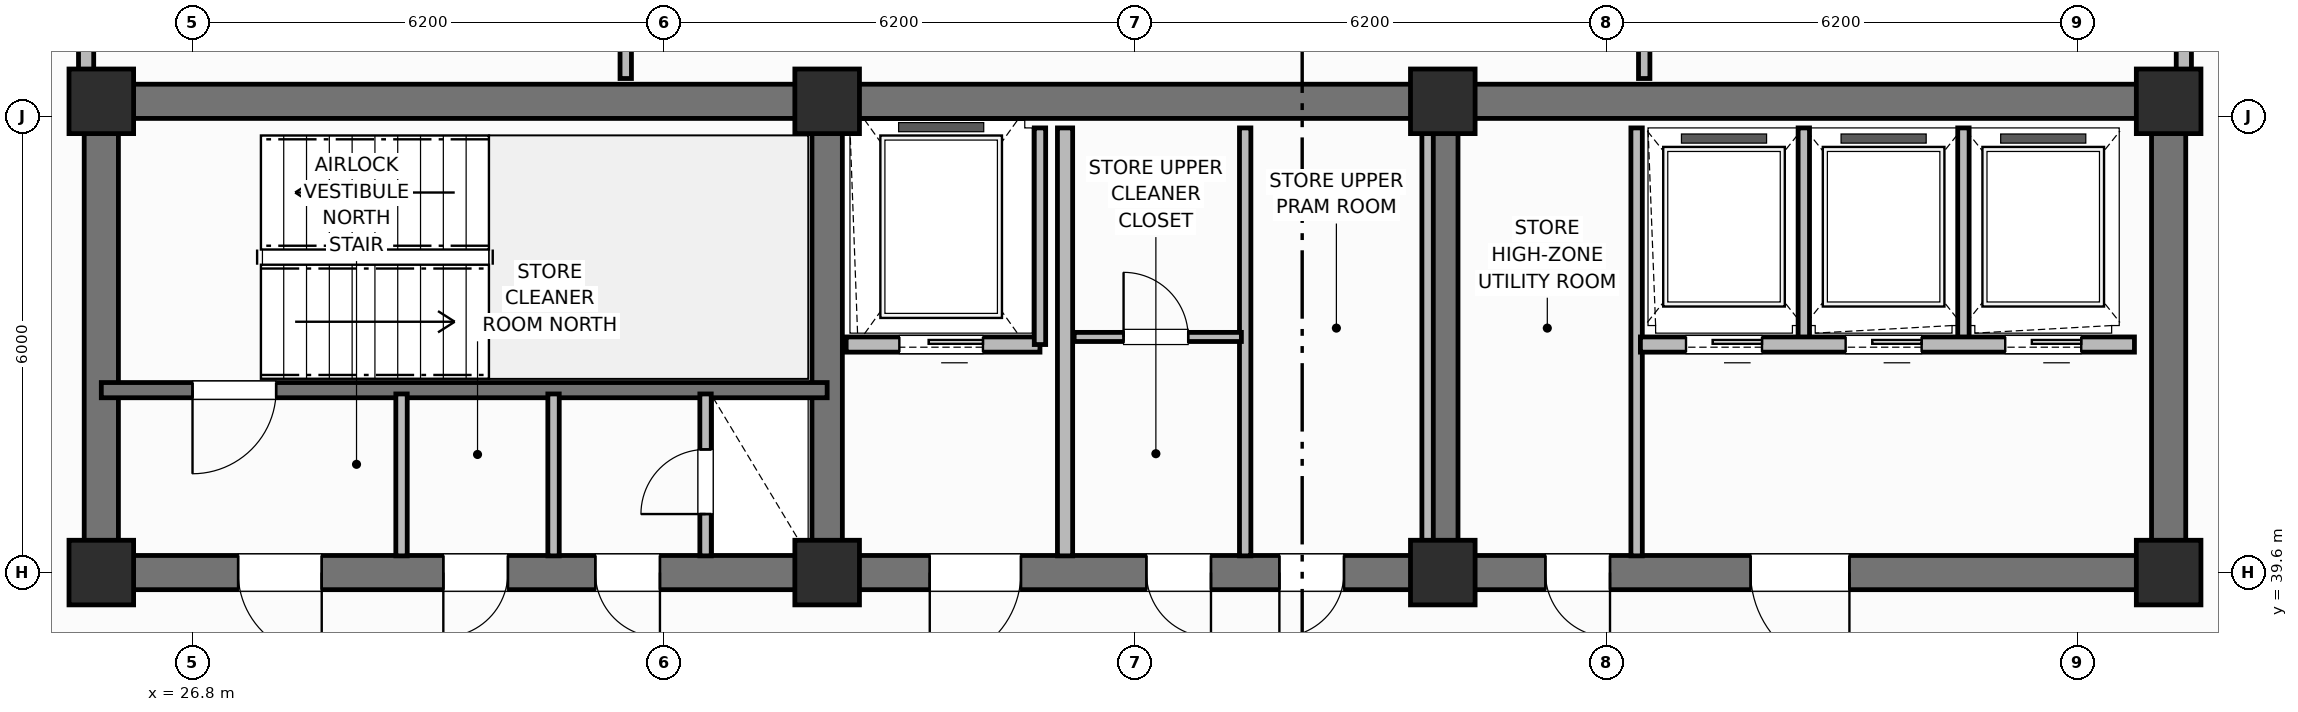
"""IFC4 building model, lengths in metres.
Left out: names, types, materials, properties, quantities, classifications, styles, units other than length and angle.
Written with IfcOpenShell. Run it as: python <this file> out.ifc"""

import sys

from ifc_helpers import new_model, si_unit, direction, frame, frame_2d, origin, origin_2d, place, context, subcontext, project, spatial, rectangle, extrude, element, fill, save


model = new_model("IFC4")
c1 = context("Model", 3, precision=1e-05, world=origin(), true_north=direction((0.0, 1.0)))
c2 = subcontext(c1, "Body", "Model", "MODEL_VIEW")
j1 = project(units=[si_unit("LENGTHUNIT", "METRE"), si_unit("PLANEANGLEUNIT", "RADIAN")], contexts=[c1])
p1 = place(None, origin())
s1 = spatial("IfcSite", under=j1, at=p1, CompositionType="ELEMENT")
p2 = place(p1, origin())
s2 = spatial("IfcBuilding", under=s1, at=p2, CompositionType="ELEMENT")
p3 = place(p2, frame((0.0, 0.0, 222.1)))
s3 = spatial("IfcBuildingStorey", under=s2, at=p3, CompositionType="ELEMENT", Elevation=222.1)
p4 = place(p3, frame((25.6, 45.8, 0.0), z_axis=(0.0, 0.0, 1.0), x_axis=(1.0, 0.0, 0.0)))
e1 = element("IfcWall", 1, at=p4, inside=s3, PredefinedType="SHEAR", context=c2, shape_type="SweptSolid", body=[
    extrude(rectangle(XDim=27.2, YDim=0.45, at=frame_2d((13.6, 0.0))), origin(), (0.0, 0.0, 1.0), 3.7),
])
for number, where, z_axis, x_axis in (
    (2, (25.6, 39.825, 0.0), (0.0, 0.0, 1.0), (0.0, 1.0, 0.0)),
    (3, (52.8, 39.825, 0.0), (0.0, 0.0, 1.0), (0.0, 1.0, 0.0)),
):
    element("IfcWall", number, at=place(p3, frame(where, z_axis=z_axis, x_axis=x_axis)), inside=s3, PredefinedType="SHEAR", context=c2, shape_type="SweptSolid", body=[
        extrude(rectangle(XDim=5.75, YDim=0.45, at=frame_2d((2.875, 0.0))), origin(), (0.0, 0.0, 1.0), 3.7),
    ])
p5 = place(p3, frame((52.8, 39.6, 0.0), z_axis=(0.0, 0.0, 1.0), x_axis=(-1.0, 0.0, 0.0)))
e4 = element("IfcWall", 4, at=p5, inside=s3, PredefinedType="SHEAR", context=c2, shape_type="SweptSolid", body=[
    extrude(rectangle(XDim=27.2, YDim=0.45, at=frame_2d((13.6, 0.0))), origin(), (0.0, 0.0, 1.0), 3.7),
])
p6 = place(p5, frame((24.3, 0.0, 0.0)))
e5 = element("IfcOpeningElement", 5, at=p6, cuts=e4, PredefinedType="OPENING", context=c2, shape_type="SweptSolid", body=[
    extrude(rectangle(XDim=1.1, YDim=2.15, at=frame_2d((0.55, 1.075))), frame((0.0, 0.235, 0.0), z_axis=(0.0, -1.0, 0.0), x_axis=(1.0, 0.0, 0.0)), (0.0, 0.0, 1.0), 0.47),
])
p7 = place(p5, frame((21.85, 0.0, 0.0)))
e6 = element("IfcOpeningElement", 6, at=p7, cuts=e4, PredefinedType="OPENING", context=c2, shape_type="SweptSolid", body=[
    extrude(rectangle(XDim=0.85, YDim=2.1, at=frame_2d((0.425, 1.05))), frame((0.0, 0.235, 0.0), z_axis=(0.0, -1.0, 0.0), x_axis=(1.0, 0.0, 0.0)), (0.0, 0.0, 1.0), 0.47),
])
p8 = place(p5, frame((19.85, 0.0, 0.0)))
e7 = element("IfcOpeningElement", 7, at=p8, cuts=e4, PredefinedType="OPENING", context=c2, shape_type="SweptSolid", body=[
    extrude(rectangle(XDim=0.85, YDim=2.1, at=frame_2d((0.425, 1.05))), frame((0.0, 0.235, 0.0), z_axis=(0.0, -1.0, 0.0), x_axis=(1.0, 0.0, 0.0)), (0.0, 0.0, 1.0), 0.47),
])
p9 = place(p5, frame((15.1, 0.0, 0.0)))
e8 = element("IfcOpeningElement", 8, at=p9, cuts=e4, PredefinedType="OPENING", context=c2, shape_type="SweptSolid", body=[
    extrude(rectangle(XDim=1.2, YDim=2.15, at=frame_2d((0.6, 1.075))), frame((0.0, 0.235, 0.0), z_axis=(0.0, -1.0, 0.0), x_axis=(1.0, 0.0, 0.0)), (0.0, 0.0, 1.0), 0.47),
])
p10 = place(p5, frame((12.6, 0.0, 0.0)))
e9 = element("IfcOpeningElement", 9, at=p10, cuts=e4, PredefinedType="OPENING", context=c2, shape_type="SweptSolid", body=[
    extrude(rectangle(XDim=0.85, YDim=2.1, at=frame_2d((0.425, 1.05))), frame((0.0, 0.235, 0.0), z_axis=(0.0, -1.0, 0.0), x_axis=(1.0, 0.0, 0.0)), (0.0, 0.0, 1.0), 0.47),
])
p11 = place(p5, frame((10.85, 0.0, 0.0)))
e10 = element("IfcOpeningElement", 10, at=p11, cuts=e4, PredefinedType="OPENING", context=c2, shape_type="SweptSolid", body=[
    extrude(rectangle(XDim=0.85, YDim=2.1, at=frame_2d((0.425, 1.05))), frame((0.0, 0.235, 0.0), z_axis=(0.0, -1.0, 0.0), x_axis=(1.0, 0.0, 0.0)), (0.0, 0.0, 1.0), 0.47),
])
p12 = place(p5, frame((7.35, 0.0, 0.0)))
e11 = element("IfcOpeningElement", 11, at=p12, cuts=e4, PredefinedType="OPENING", context=c2, shape_type="SweptSolid", body=[
    extrude(rectangle(XDim=0.85, YDim=2.1, at=frame_2d((0.425, 1.05))), frame((0.0, 0.235, 0.0), z_axis=(0.0, -1.0, 0.0), x_axis=(1.0, 0.0, 0.0)), (0.0, 0.0, 1.0), 0.47),
])
p13 = place(p5, frame((4.2, 0.0, 0.0)))
e12 = element("IfcOpeningElement", 12, at=p13, cuts=e4, PredefinedType="OPENING", context=c2, shape_type="SweptSolid", body=[
    extrude(rectangle(XDim=1.3, YDim=2.2, at=frame_2d((0.65, 1.1))), frame((0.0, 0.235, 0.0), z_axis=(0.0, -1.0, 0.0), x_axis=(1.0, 0.0, 0.0)), (0.0, 0.0, 1.0), 0.47),
])
for number, where, z_axis, x_axis in (
    (13, (35.15, 39.825, 0.0), (0.0, 0.0, 1.0), (0.0, 1.0, 0.0)),
    (14, (43.25, 39.825, 0.0), (0.0, 0.0, 1.0), (0.0, 1.0, 0.0)),
):
    element("IfcWall", number, at=place(p3, frame(where, z_axis=z_axis, x_axis=x_axis)), inside=s3, PredefinedType="SHEAR", context=c2, shape_type="SweptSolid", body=[
        extrude(rectangle(XDim=5.75, YDim=0.4, at=frame_2d((2.875, 0.0))), origin(), (0.0, 0.0, 1.0), 3.7),
    ])
for number, where, z_axis, x_axis in (
    (15, (25.6, 39.6, 0.0), (0.0, 0.0, 1.0), (1.0, 0.0, 0.0)),
    (16, (25.6, 45.8, 0.0), (0.0, 0.0, 1.0), (1.0, 0.0, 0.0)),
    (17, (35.15, 39.6, 0.0), (0.0, 0.0, 1.0), (1.0, 0.0, 0.0)),
    (18, (35.15, 45.8, 0.0), (0.0, 0.0, 1.0), (1.0, 0.0, 0.0)),
    (19, (43.25, 39.6, 0.0), (0.0, 0.0, 1.0), (1.0, 0.0, 0.0)),
    (20, (43.25, 45.8, 0.0), (0.0, 0.0, 1.0), (1.0, 0.0, 0.0)),
    (21, (52.8, 39.6, 0.0), (0.0, 0.0, 1.0), (1.0, 0.0, 0.0)),
    (22, (52.8, 45.8, 0.0), (0.0, 0.0, 1.0), (1.0, 0.0, 0.0)),
):
    element("IfcColumn", number, at=place(p3, frame(where, z_axis=z_axis, x_axis=x_axis)), inside=s3, PredefinedType="COLUMN", context=c2, shape_type="SweptSolid", body=[
        extrude(rectangle(XDim=0.85, YDim=0.85, at=origin_2d()), origin(), (0.0, 0.0, 1.0), 3.7),
    ])
p14 = place(p3, frame((35.15, 42.0, 0.0), z_axis=(0.0, 0.0, 1.0), x_axis=(-1.0, 0.0, 0.0)))
e23 = element("IfcWall", 23, at=p14, inside=s3, PredefinedType="SHEAR", context=c2, shape_type="SweptSolid", body=[
    extrude(rectangle(XDim=9.55, YDim=0.2, at=frame_2d((4.775, 0.0))), origin(), (0.0, 0.0, 1.0), 3.7),
])
p15 = place(p14, frame((7.25, 0.0, 0.0)))
e24 = element("IfcOpeningElement", 24, at=p15, cuts=e23, PredefinedType="OPENING", context=c2, shape_type="SweptSolid", body=[
    extrude(rectangle(XDim=1.1, YDim=2.15, at=frame_2d((0.55, 1.075))), frame((0.0, 0.11, 0.0), z_axis=(0.0, -1.0, 0.0), x_axis=(1.0, 0.0, 0.0)), (0.0, 0.0, 1.0), 0.22),
])
p16 = place(p3, frame((33.55, 39.82, 0.0), z_axis=(0.0, 0.0, 1.0), x_axis=(0.0, 1.0, 0.0)))
e25 = element("IfcWall", 25, at=p16, inside=s3, PredefinedType="PARTITIONING", context=c2, shape_type="SweptSolid", body=[
    extrude(rectangle(XDim=2.13, YDim=0.15, at=frame_2d((1.065, 0.0))), origin(), (0.0, 0.0, 1.0), 2.24),
])
p17 = place(p16, frame((0.55, 0.0, 0.0)))
e26 = element("IfcOpeningElement", 26, at=p17, cuts=e25, PredefinedType="OPENING", context=c2, shape_type="SweptSolid", body=[
    extrude(rectangle(XDim=0.85, YDim=2.05, at=frame_2d((0.425, 1.025))), frame((0.0, 0.085, 0.0), z_axis=(0.0, -1.0, 0.0), x_axis=(1.0, 0.0, 0.0)), (0.0, 0.0, 1.0), 0.17),
])
for number, where, z_axis, x_axis in (
    (27, (29.55, 39.82, 0.0), (0.0, 0.0, 1.0), (0.0, 1.0, 0.0)),
    (28, (31.55, 39.82, 0.0), (0.0, 0.0, 1.0), (0.0, 1.0, 0.0)),
):
    element("IfcWall", number, at=place(p3, frame(where, z_axis=z_axis, x_axis=x_axis)), inside=s3, PredefinedType="PARTITIONING", context=c2, shape_type="SweptSolid", body=[
        extrude(rectangle(XDim=2.13, YDim=0.15, at=frame_2d((1.065, 0.0))), origin(), (0.0, 0.0, 1.0), 2.24),
    ])
p18 = place(p3, frame((37.95, 42.6, 0.0), z_axis=(0.0, 0.0, 1.0), x_axis=(-1.0, 0.0, 0.0)))
e29 = element("IfcWall", 29, at=p18, inside=s3, PredefinedType="PARTITIONING", context=c2, shape_type="SweptSolid", body=[
    extrude(rectangle(XDim=2.55, YDim=0.2, at=frame_2d((1.275, 0.0))), origin(), (0.0, 0.0, 1.0), 2.18),
])
p19 = place(p18, frame((0.75, 0.0, 0.0)))
e30 = element("IfcOpeningElement", 30, at=p19, cuts=e29, PredefinedType="OPENING", context=c2, shape_type="SweptSolid", body=[
    extrude(rectangle(XDim=1.1, YDim=2.15, at=frame_2d((0.55, 1.075))), frame((0.0, 0.11, 0.0), z_axis=(0.0, -1.0, 0.0), x_axis=(1.0, 0.0, 0.0)), (0.0, 0.0, 1.0), 0.22),
])
p20 = place(p3, frame((37.95, 42.6, 0.0), z_axis=(0.0, 0.0, 1.0), x_axis=(0.0, 1.0, 0.0)))
e31 = element("IfcWall", 31, at=p20, inside=s3, PredefinedType="PARTITIONING", context=c2, shape_type="SweptSolid", body=[
    extrude(rectangle(XDim=2.85, YDim=0.15, at=frame_2d((1.425, 0.0))), origin(), (0.0, 0.0, 1.0), 2.24),
])
p21 = place(p3, frame((38.28, 39.82, 0.0), z_axis=(0.0, 0.0, 1.0), x_axis=(0.0, 1.0, 0.0)))
e32 = element("IfcWall", 32, at=p21, inside=s3, PredefinedType="PARTITIONING", context=c2, shape_type="SweptSolid", body=[
    extrude(rectangle(XDim=5.63, YDim=0.2, at=frame_2d((2.815, 0.0))), origin(), (0.0, 0.0, 1.0), 2.24),
])
for number, where, z_axis, x_axis in (
    (33, (43.05, 39.82, 0.0), (0.0, 0.0, 1.0), (0.0, 1.0, 0.0)),
    (34, (40.65, 39.82, 0.0), (0.0, 0.0, 1.0), (0.0, 1.0, 0.0)),
):
    element("IfcWall", number, at=place(p3, frame(where, z_axis=z_axis, x_axis=x_axis)), inside=s3, PredefinedType="PARTITIONING", context=c2, shape_type="SweptSolid", body=[
        extrude(rectangle(XDim=5.63, YDim=0.15, at=frame_2d((2.815, 0.0))), origin(), (0.0, 0.0, 1.0), 2.24),
    ])
p22 = place(p3, frame((38.4, 42.7, 0.0), z_axis=(0.0, 0.0, 1.0), x_axis=(1.0, 0.0, 0.0)))
e35 = element("IfcWall", 35, at=p22, inside=s3, PredefinedType="PARTITIONING", context=c2, shape_type="SweptSolid", body=[
    extrude(rectangle(XDim=2.2, YDim=0.12, at=frame_2d((1.1, 0.0))), origin(), (0.0, 0.0, 1.0), 2.18),
])
p23 = place(p22, frame((0.65, 0.0, 0.0)))
e36 = element("IfcOpeningElement", 36, at=p23, cuts=e35, PredefinedType="OPENING", context=c2, shape_type="SweptSolid", body=[
    extrude(rectangle(XDim=0.85, YDim=2.1, at=frame_2d((0.425, 1.05))), frame((0.0, 0.07, 0.0), z_axis=(0.0, -1.0, 0.0), x_axis=(1.0, 0.0, 0.0)), (0.0, 0.0, 1.0), 0.14),
])
p24 = place(p3, frame((45.8, 39.82, 0.0), z_axis=(0.0, 0.0, 1.0), x_axis=(0.0, 1.0, 0.0)))
e37 = element("IfcWall", 37, at=p24, inside=s3, PredefinedType="PARTITIONING", context=c2, shape_type="SweptSolid", body=[
    extrude(rectangle(XDim=5.63, YDim=0.15, at=frame_2d((2.815, 0.0))), origin(), (0.0, 0.0, 1.0), 2.24),
])
for number, where, z_axis, x_axis in (
    (38, (48.0, 42.65, 0.0), (0.0, 0.0, 1.0), (0.0, 1.0, 0.0)),
    (39, (50.1, 42.65, 0.0), (0.0, 0.0, 1.0), (0.0, 1.0, 0.0)),
):
    element("IfcWall", number, at=place(p3, frame(where, z_axis=z_axis, x_axis=x_axis)), inside=s3, PredefinedType="PARTITIONING", context=c2, shape_type="SweptSolid", body=[
        extrude(rectangle(XDim=2.8, YDim=0.15, at=frame_2d((1.4, 0.0))), origin(), (0.0, 0.0, 1.0), 2.24),
    ])
p25 = place(p3, frame((52.35, 42.6, 0.0), z_axis=(0.0, 0.0, 1.0), x_axis=(-1.0, 0.0, 0.0)))
e40 = element("IfcWall", 40, at=p25, inside=s3, PredefinedType="PARTITIONING", context=c2, shape_type="SweptSolid", body=[
    extrude(rectangle(XDim=6.5, YDim=0.2, at=frame_2d((3.25, 0.0))), origin(), (0.0, 0.0, 1.0), 2.24),
])
p26 = place(p25, frame((4.9, 0.0, 0.0)))
e41 = element("IfcOpeningElement", 41, at=p26, cuts=e40, PredefinedType="OPENING", context=c2, shape_type="SweptSolid", body=[
    extrude(rectangle(XDim=1.0, YDim=2.15, at=frame_2d((0.5, 1.075))), frame((0.0, 0.11, 0.0), z_axis=(0.0, -1.0, 0.0), x_axis=(1.0, 0.0, 0.0)), (0.0, 0.0, 1.0), 0.22),
])
p27 = place(p25, frame((2.8, 0.0, 0.0)))
e42 = element("IfcOpeningElement", 42, at=p27, cuts=e40, PredefinedType="OPENING", context=c2, shape_type="SweptSolid", body=[
    extrude(rectangle(XDim=1.0, YDim=2.15, at=frame_2d((0.5, 1.075))), frame((0.0, 0.11, 0.0), z_axis=(0.0, -1.0, 0.0), x_axis=(1.0, 0.0, 0.0)), (0.0, 0.0, 1.0), 0.22),
])
p28 = place(p25, frame((0.7, 0.0, 0.0)))
e43 = element("IfcOpeningElement", 43, at=p28, cuts=e40, PredefinedType="OPENING", context=c2, shape_type="SweptSolid", body=[
    extrude(rectangle(XDim=1.0, YDim=2.15, at=frame_2d((0.5, 1.075))), frame((0.0, 0.11, 0.0), z_axis=(0.0, -1.0, 0.0), x_axis=(1.0, 0.0, 0.0)), (0.0, 0.0, 1.0), 0.22),
])
p29 = place(p3, frame((32.5, 46.1, 0.0), z_axis=(0.0, 0.0, 1.0), x_axis=(0.0, 1.0, 0.0)))
e44 = element("IfcWall", 44, at=p29, inside=s3, PredefinedType="PARTITIONING", context=c2, shape_type="SweptSolid", body=[
    extrude(rectangle(XDim=3.43, YDim=0.15, at=frame_2d((1.715, 0.0))), origin(), (0.0, 0.0, 1.0), 2.24),
])
p30 = place(p29, frame((0.85, 0.0, 0.0)))
e45 = element("IfcOpeningElement", 45, at=p30, cuts=e44, PredefinedType="OPENING", context=c2, shape_type="SweptSolid", body=[
    extrude(rectangle(XDim=0.9, YDim=2.1, at=frame_2d((0.45, 1.05))), frame((0.0, 0.085, 0.0), z_axis=(0.0, -1.0, 0.0), x_axis=(1.0, 0.0, 0.0)), (0.0, 0.0, 1.0), 0.17),
])
p31 = place(p3, frame((45.9, 46.1, 0.0), z_axis=(0.0, 0.0, 1.0), x_axis=(0.0, 1.0, 0.0)))
e46 = element("IfcWall", 46, at=p31, inside=s3, PredefinedType="PARTITIONING", context=c2, shape_type="SweptSolid", body=[
    extrude(rectangle(XDim=3.43, YDim=0.15, at=frame_2d((1.715, 0.0))), origin(), (0.0, 0.0, 1.0), 2.24),
])
p32 = place(p3, frame((25.4, 46.1, 0.0), z_axis=(0.0, 0.0, 1.0), x_axis=(0.0, 1.0, 0.0)))
e47 = element("IfcWall", 47, at=p32, inside=s3, PredefinedType="PARTITIONING", context=c2, shape_type="SweptSolid", body=[
    extrude(rectangle(XDim=2.38, YDim=0.2, at=frame_2d((1.19, 0.0))), origin(), (0.0, 0.0, 1.0), 2.24),
])
p33 = place(p32, frame((0.65, 0.0, 0.0)))
e48 = element("IfcOpeningElement", 48, at=p33, cuts=e47, PredefinedType="OPENING", context=c2, shape_type="SweptSolid", body=[
    extrude(rectangle(XDim=0.9, YDim=2.1, at=frame_2d((0.45, 1.05))), frame((0.0, 0.11, 0.0), z_axis=(0.0, -1.0, 0.0), x_axis=(1.0, 0.0, 0.0)), (0.0, 0.0, 1.0), 0.22),
])
p34 = place(p3, frame((53.0, 46.1, 0.0), z_axis=(0.0, 0.0, 1.0), x_axis=(0.0, 1.0, 0.0)))
e49 = element("IfcWall", 49, at=p34, inside=s3, PredefinedType="PARTITIONING", context=c2, shape_type="SweptSolid", body=[
    extrude(rectangle(XDim=2.38, YDim=0.2, at=frame_2d((1.19, 0.0))), origin(), (0.0, 0.0, 1.0), 2.24),
])
p35 = place(p34, frame((0.65, 0.0, 0.0)))
e50 = element("IfcOpeningElement", 50, at=p35, cuts=e49, PredefinedType="OPENING", context=c2, shape_type="SweptSolid", body=[
    extrude(rectangle(XDim=0.9, YDim=2.1, at=frame_2d((0.45, 1.05))), frame((0.0, 0.11, 0.0), z_axis=(0.0, -1.0, 0.0), x_axis=(1.0, 0.0, 0.0)), (0.0, 0.0, 1.0), 0.22),
])
p36 = place(p15, origin())
e51 = element("IfcDoor", 51, at=p36, inside=s3, OperationType="SINGLE_SWING_RIGHT", PredefinedType="DOOR", context=c2, shape_type="SweptSolid", body=[
    extrude(rectangle(XDim=1.1, YDim=2.15, at=frame_2d((0.55, 1.075))), frame((0.0, 0.025, 0.0), z_axis=(0.0, -1.0, 0.0), x_axis=(1.0, 0.0, 0.0)), (0.0, 0.0, 1.0), 0.05),
])
fill(e24, e51)
p37 = place(p17, origin())
e52 = element("IfcDoor", 52, at=p37, inside=s3, OperationType="SINGLE_SWING_LEFT", PredefinedType="TRAPDOOR", context=c2, shape_type="SweptSolid", body=[
    extrude(rectangle(XDim=0.85, YDim=2.05, at=frame_2d((0.425, 1.025))), frame((0.0, 0.025, 0.0), z_axis=(0.0, -1.0, 0.0), x_axis=(1.0, 0.0, 0.0)), (0.0, 0.0, 1.0), 0.05),
])
fill(e26, e52)
p38 = place(p19, origin())
e53 = element("IfcDoor", 53, at=p38, inside=s3, OperationType="SLIDING_TO_LEFT", PredefinedType="DOOR", context=c2, shape_type="SweptSolid", body=[
    extrude(rectangle(XDim=1.1, YDim=2.15, at=frame_2d((0.55, 1.075))), frame((0.0, 0.025, 0.0), z_axis=(0.0, -1.0, 0.0), x_axis=(1.0, 0.0, 0.0)), (0.0, 0.0, 1.0), 0.05),
])
fill(e30, e53)
p39 = place(p23, origin())
e54 = element("IfcDoor", 54, at=p39, inside=s3, OperationType="SINGLE_SWING_LEFT", PredefinedType="DOOR", context=c2, shape_type="SweptSolid", body=[
    extrude(rectangle(XDim=0.85, YDim=2.1, at=frame_2d((0.425, 1.05))), frame((0.0, 0.025, 0.0), z_axis=(0.0, -1.0, 0.0), x_axis=(1.0, 0.0, 0.0)), (0.0, 0.0, 1.0), 0.05),
])
fill(e36, e54)
p40 = place(p26, origin())
e55 = element("IfcDoor", 55, at=p40, inside=s3, OperationType="SLIDING_TO_LEFT", PredefinedType="DOOR", context=c2, shape_type="SweptSolid", body=[
    extrude(rectangle(XDim=1.0, YDim=2.15, at=frame_2d((0.5, 1.075))), frame((0.0, 0.025, 0.0), z_axis=(0.0, -1.0, 0.0), x_axis=(1.0, 0.0, 0.0)), (0.0, 0.0, 1.0), 0.05),
])
fill(e41, e55)
p41 = place(p27, origin())
e56 = element("IfcDoor", 56, at=p41, inside=s3, OperationType="SLIDING_TO_LEFT", PredefinedType="DOOR", context=c2, shape_type="SweptSolid", body=[
    extrude(rectangle(XDim=1.0, YDim=2.15, at=frame_2d((0.5, 1.075))), frame((0.0, 0.025, 0.0), z_axis=(0.0, -1.0, 0.0), x_axis=(1.0, 0.0, 0.0)), (0.0, 0.0, 1.0), 0.05),
])
fill(e42, e56)
p42 = place(p28, origin())
e57 = element("IfcDoor", 57, at=p42, inside=s3, OperationType="SLIDING_TO_LEFT", PredefinedType="DOOR", context=c2, shape_type="SweptSolid", body=[
    extrude(rectangle(XDim=1.0, YDim=2.15, at=frame_2d((0.5, 1.075))), frame((0.0, 0.025, 0.0), z_axis=(0.0, -1.0, 0.0), x_axis=(1.0, 0.0, 0.0)), (0.0, 0.0, 1.0), 0.05),
])
fill(e43, e57)
p43 = place(p6, origin())
e58 = element("IfcDoor", 58, at=p43, inside=s3, OperationType="SINGLE_SWING_LEFT", PredefinedType="DOOR", context=c2, shape_type="SweptSolid", body=[
    extrude(rectangle(XDim=1.1, YDim=2.15, at=frame_2d((0.55, 1.075))), frame((0.0, 0.025, 0.0), z_axis=(0.0, -1.0, 0.0), x_axis=(1.0, 0.0, 0.0)), (0.0, 0.0, 1.0), 0.05),
])
fill(e5, e58)
p44 = place(p7, origin())
e59 = element("IfcDoor", 59, at=p44, inside=s3, OperationType="SINGLE_SWING_RIGHT", PredefinedType="DOOR", context=c2, shape_type="SweptSolid", body=[
    extrude(rectangle(XDim=0.85, YDim=2.1, at=frame_2d((0.425, 1.05))), frame((0.0, 0.025, 0.0), z_axis=(0.0, -1.0, 0.0), x_axis=(1.0, 0.0, 0.0)), (0.0, 0.0, 1.0), 0.05),
])
fill(e6, e59)
p45 = place(p8, origin())
e60 = element("IfcDoor", 60, at=p45, inside=s3, OperationType="SINGLE_SWING_LEFT", PredefinedType="DOOR", context=c2, shape_type="SweptSolid", body=[
    extrude(rectangle(XDim=0.85, YDim=2.1, at=frame_2d((0.425, 1.05))), frame((0.0, 0.025, 0.0), z_axis=(0.0, -1.0, 0.0), x_axis=(1.0, 0.0, 0.0)), (0.0, 0.0, 1.0), 0.05),
])
fill(e7, e60)
p46 = place(p9, origin())
e61 = element("IfcDoor", 61, at=p46, inside=s3, OperationType="SINGLE_SWING_RIGHT", PredefinedType="DOOR", context=c2, shape_type="SweptSolid", body=[
    extrude(rectangle(XDim=1.2, YDim=2.15, at=frame_2d((0.6, 1.075))), frame((0.0, 0.025, 0.0), z_axis=(0.0, -1.0, 0.0), x_axis=(1.0, 0.0, 0.0)), (0.0, 0.0, 1.0), 0.05),
])
fill(e8, e61)
p47 = place(p10, origin())
e62 = element("IfcDoor", 62, at=p47, inside=s3, OperationType="SINGLE_SWING_LEFT", PredefinedType="DOOR", context=c2, shape_type="SweptSolid", body=[
    extrude(rectangle(XDim=0.85, YDim=2.1, at=frame_2d((0.425, 1.05))), frame((0.0, 0.025, 0.0), z_axis=(0.0, -1.0, 0.0), x_axis=(1.0, 0.0, 0.0)), (0.0, 0.0, 1.0), 0.05),
])
fill(e9, e62)
p48 = place(p11, origin())
e63 = element("IfcDoor", 63, at=p48, inside=s3, OperationType="SINGLE_SWING_RIGHT", PredefinedType="DOOR", context=c2, shape_type="SweptSolid", body=[
    extrude(rectangle(XDim=0.85, YDim=2.1, at=frame_2d((0.425, 1.05))), frame((0.0, 0.025, 0.0), z_axis=(0.0, -1.0, 0.0), x_axis=(1.0, 0.0, 0.0)), (0.0, 0.0, 1.0), 0.05),
])
fill(e10, e63)
p49 = place(p12, origin())
e64 = element("IfcDoor", 64, at=p49, inside=s3, OperationType="SINGLE_SWING_LEFT", PredefinedType="DOOR", context=c2, shape_type="SweptSolid", body=[
    extrude(rectangle(XDim=0.85, YDim=2.1, at=frame_2d((0.425, 1.05))), frame((0.0, 0.025, 0.0), z_axis=(0.0, -1.0, 0.0), x_axis=(1.0, 0.0, 0.0)), (0.0, 0.0, 1.0), 0.05),
])
fill(e11, e64)
p50 = place(p13, origin())
e65 = element("IfcDoor", 65, at=p50, inside=s3, OperationType="SINGLE_SWING_LEFT", PredefinedType="DOOR", context=c2, shape_type="SweptSolid", body=[
    extrude(rectangle(XDim=1.3, YDim=2.2, at=frame_2d((0.65, 1.1))), frame((0.0, 0.025, 0.0), z_axis=(0.0, -1.0, 0.0), x_axis=(1.0, 0.0, 0.0)), (0.0, 0.0, 1.0), 0.05),
])
fill(e12, e65)
save(model, sys.argv[1])
